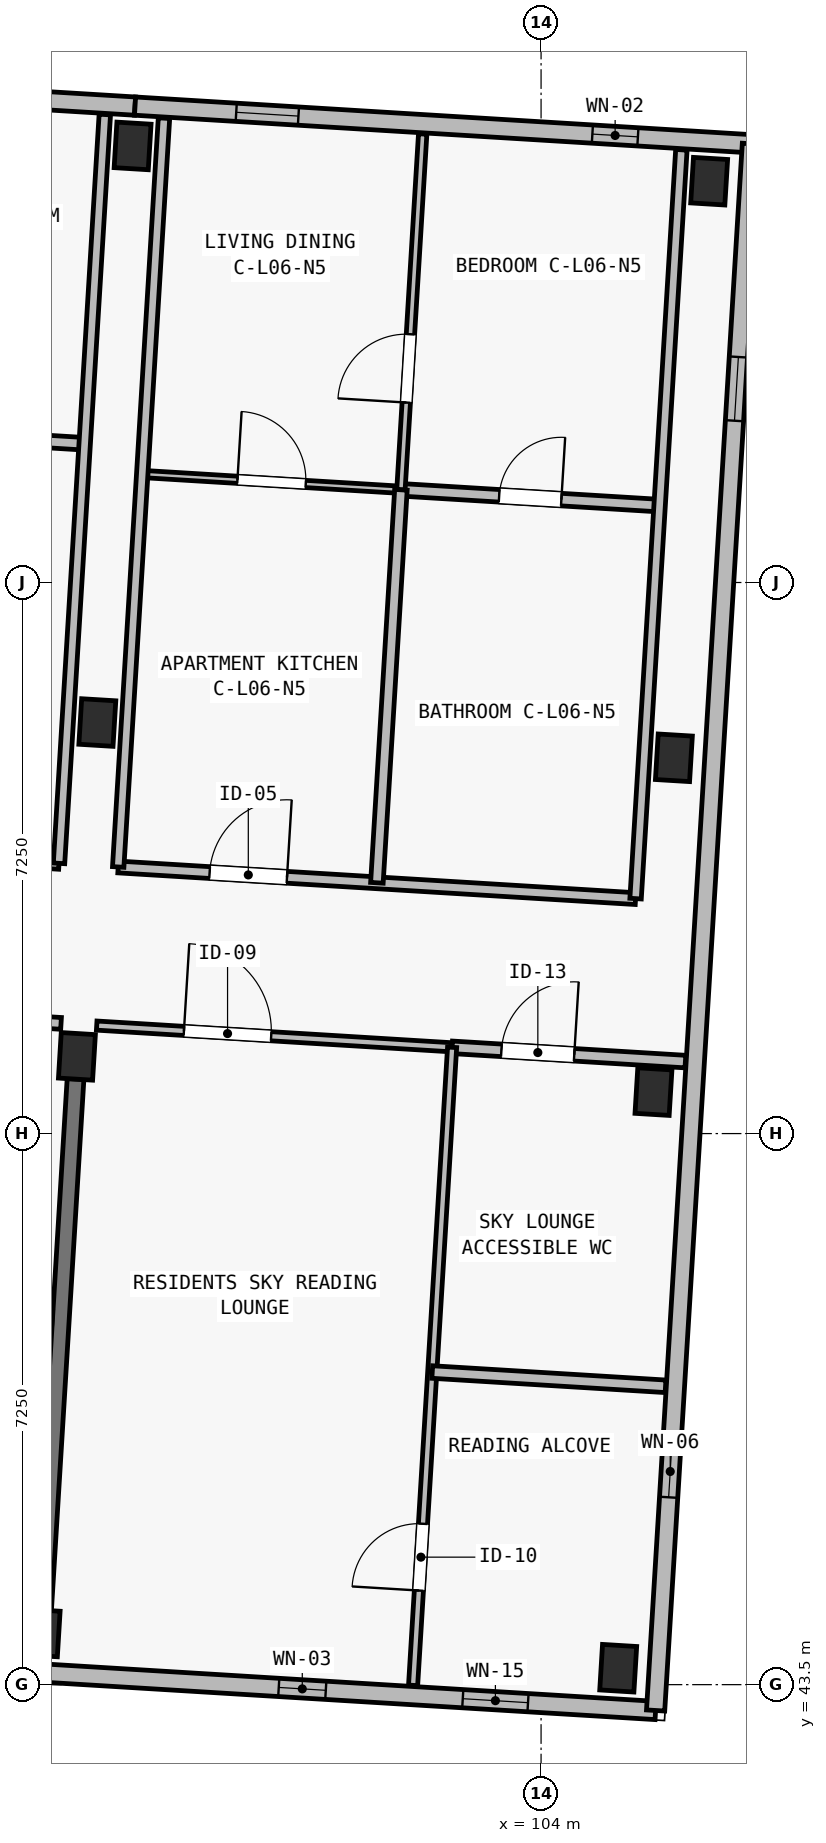
"""IFC4 building model, lengths in metres.
Left out: names, types, materials, properties, quantities, classifications, styles, units other than length and angle.
Written with IfcOpenShell. Run it as: python <this file> out.ifc"""

import sys

from ifc_helpers import new_model, si_unit, direction, frame, frame_2d, origin, origin_2d, place, context, subcontext, project, spatial, rectangle, extrude, element, fill, save


model = new_model("IFC4")
c1 = context("Model", 3, precision=1e-05, world=origin(), true_north=direction((0.0, 1.0)))
c2 = subcontext(c1, "Body", "Model", "MODEL_VIEW")
j1 = project(units=[si_unit("LENGTHUNIT", "METRE"), si_unit("PLANEANGLEUNIT", "RADIAN")], contexts=[c1])
p1 = place(None, origin())
s1 = spatial("IfcSite", under=j1, at=p1, CompositionType="ELEMENT")
p2 = place(p1, origin())
s2 = spatial("IfcBuilding", under=s1, at=p2, CompositionType="ELEMENT")
p3 = place(p2, frame((0.0, 0.0, 21.4)))
s3 = spatial("IfcBuildingStorey", under=s2, at=p3, CompositionType="ELEMENT", Elevation=21.4)
for number, where, z_axis, x_axis in (
    (1, (97.429, 44.18, 0.0), (0.0, 0.0, 1.0), (0.998, -0.061, 0.0)),
    (2, (97.893, 51.766, 0.0), (0.0, 0.0, 1.0), (0.998, -0.061, 0.0)),
    (3, (98.162, 56.158, 0.0), (0.0, 0.0, 1.0), (0.998, -0.061, 0.0)),
    (4, (98.626, 63.744, 0.0), (0.0, 0.0, 1.0), (0.998, -0.061, 0.0)),
    (5, (105.015, 43.716, 0.0), (0.0, 0.0, 1.0), (0.998, -0.061, 0.0)),
    (6, (105.479, 51.302, 0.0), (0.0, 0.0, 1.0), (0.998, -0.061, 0.0)),
    (7, (105.748, 55.694, 0.0), (0.0, 0.0, 1.0), (0.998, -0.061, 0.0)),
    (8, (106.211, 63.28, 0.0), (0.0, 0.0, 1.0), (0.998, -0.061, 0.0)),
):
    element("IfcColumn", number, at=place(p3, frame(where, z_axis=z_axis, x_axis=x_axis)), inside=s3, PredefinedType="COLUMN", context=c2, shape_type="SweptSolid", body=[
        extrude(rectangle(XDim=0.45, YDim=0.6, at=origin_2d()), origin(), (0.0, 0.0, 1.0), 3.25),
    ])
p4 = place(p3, frame((97.448, 44.479, 0.0), z_axis=(0.0, 0.0, 1.0), x_axis=(0.061034188237, 0.998135676081, 0.0)))
e9 = element("IfcWall", 9, at=p4, inside=s3, PredefinedType="SHEAR", context=c2, shape_type="SweptSolid", body=[
    extrude(rectangle(XDim=7.0, YDim=0.22, at=frame_2d((3.5, 0.0))), origin(), (0.0, 0.0, 1.0), 2.5),
])
p5 = place(p3, frame((105.507, 43.16, 0.0), z_axis=(0.0, 0.0, 1.0), x_axis=(-0.998134248939, 0.061057522844, 0.0)))
e10 = element("IfcWall", 10, at=p5, inside=s3, PredefinedType="SOLIDWALL", context=c2, shape_type="SweptSolid", body=[
    extrude(rectangle(XDim=8.125, YDim=0.24, at=frame_2d((4.062, 0.0))), origin(), (0.0, 0.0, 1.0), 3.0),
])
p6 = place(p5, frame((1.682, 0.0, 0.5)))
e11 = element("IfcOpeningElement", 11, at=p6, cuts=e10, PredefinedType="OPENING", context=c2, shape_type="SweptSolid", body=[
    extrude(rectangle(XDim=0.86, YDim=2.36, at=frame_2d((0.43, 1.18))), frame((0.0, 0.135, 0.0), z_axis=(0.0, -1.0, 0.0), x_axis=(1.0, 0.0, 0.0)), (0.0, 0.0, 1.0), 0.27),
])
p7 = place(p5, frame((4.347, 0.0, 0.52)))
e12 = element("IfcOpeningElement", 12, at=p7, cuts=e10, PredefinedType="OPENING", context=c2, shape_type="SweptSolid", body=[
    extrude(rectangle(XDim=0.62, YDim=2.28, at=frame_2d((0.31, 1.14))), frame((0.0, 0.135, 0.0), z_axis=(0.0, -1.0, 0.0), x_axis=(1.0, 0.0, 0.0)), (0.0, 0.0, 1.0), 0.27),
])
p8 = place(p3, frame((91.072, 64.732, 0.0), z_axis=(0.0, 0.0, 1.0), x_axis=(0.998133591969, -0.061068261669, 0.0)))
e13 = element("IfcWall", 13, at=p8, inside=s3, PredefinedType="SOLIDWALL", context=c2, shape_type="SweptSolid", body=[
    extrude(rectangle(XDim=7.6, YDim=0.24, at=frame_2d((3.8, 0.0))), origin(), (0.0, 0.0, 1.0), 3.0),
])
p9 = place(p8, frame((1.854, 0.0, 0.44)))
e14 = element("IfcOpeningElement", 14, at=p9, cuts=e13, PredefinedType="OPENING", context=c2, shape_type="SweptSolid", body=[
    extrude(rectangle(XDim=0.68, YDim=2.24, at=frame_2d((0.34, 1.12))), frame((0.0, 0.135, 0.0), z_axis=(0.0, -1.0, 0.0), x_axis=(1.0, 0.0, 0.0)), (0.0, 0.0, 1.0), 0.27),
])
p10 = place(p8, frame((5.018, 0.0, 0.5)))
e15 = element("IfcOpeningElement", 15, at=p10, cuts=e13, PredefinedType="OPENING", context=c2, shape_type="SweptSolid", body=[
    extrude(rectangle(XDim=0.76, YDim=2.34, at=frame_2d((0.38, 1.17))), frame((0.0, 0.135, 0.0), z_axis=(0.0, -1.0, 0.0), x_axis=(1.0, 0.0, 0.0)), (0.0, 0.0, 1.0), 0.27),
])
p11 = place(p3, frame((98.658, 64.268, 0.0), z_axis=(0.0, 0.0, 1.0), x_axis=(0.998134248939, -0.061057522844, 0.0)))
e16 = element("IfcWall", 16, at=p11, inside=s3, PredefinedType="SOLIDWALL", context=c2, shape_type="SweptSolid", body=[
    extrude(rectangle(XDim=8.125, YDim=0.24, at=frame_2d((4.062, 0.0))), origin(), (0.0, 0.0, 1.0), 3.0),
])
p12 = place(p11, frame((1.334, 0.0, 0.5)))
e17 = element("IfcOpeningElement", 17, at=p12, cuts=e16, PredefinedType="OPENING", context=c2, shape_type="SweptSolid", body=[
    extrude(rectangle(XDim=0.82, YDim=2.18, at=frame_2d((0.41, 1.09))), frame((0.0, 0.135, 0.0), z_axis=(0.0, -1.0, 0.0), x_axis=(1.0, 0.0, 0.0)), (0.0, 0.0, 1.0), 0.27),
])
p13 = place(p11, frame((6.029, 0.0, 0.44)))
e18 = element("IfcOpeningElement", 18, at=p13, cuts=e16, PredefinedType="OPENING", context=c2, shape_type="SweptSolid", body=[
    extrude(rectangle(XDim=0.6, YDim=2.22, at=frame_2d((0.3, 1.11))), frame((0.0, 0.135, 0.0), z_axis=(0.0, -1.0, 0.0), x_axis=(1.0, 0.0, 0.0)), (0.0, 0.0, 1.0), 0.27),
])
p14 = place(p3, frame((106.768, 63.771, 0.0), z_axis=(0.0, 0.0, 1.0), x_axis=(-0.061053332998, -0.99813450523, 0.0)))
e19 = element("IfcWall", 19, at=p14, inside=s3, PredefinedType="SOLIDWALL", context=c2, shape_type="SweptSolid", body=[
    extrude(rectangle(XDim=20.65, YDim=0.24, at=frame_2d((10.325, 0.0))), origin(), (0.0, 0.0, 1.0), 3.0),
])
p15 = place(p14, frame((2.81, 0.0, 0.45)))
e20 = element("IfcOpeningElement", 20, at=p15, cuts=e19, PredefinedType="OPENING", context=c2, shape_type="SweptSolid", body=[
    extrude(rectangle(XDim=0.84, YDim=2.28, at=frame_2d((0.42, 1.14))), frame((0.0, 0.135, 0.0), z_axis=(0.0, -1.0, 0.0), x_axis=(1.0, 0.0, 0.0)), (0.0, 0.0, 1.0), 0.27),
])
p16 = place(p14, frame((17.16, 0.0, 0.52)))
e21 = element("IfcOpeningElement", 21, at=p16, cuts=e19, PredefinedType="OPENING", context=c2, shape_type="SweptSolid", body=[
    extrude(rectangle(XDim=0.68, YDim=2.24, at=frame_2d((0.34, 1.12))), frame((0.0, 0.135, 0.0), z_axis=(0.0, -1.0, 0.0), x_axis=(1.0, 0.0, 0.0)), (0.0, 0.0, 1.0), 0.27),
])
p17 = place(p3, frame((90.567, 52.635, 0.0), z_axis=(0.0, 0.0, 1.0), x_axis=(0.998134569689, -0.061052279168, 0.0)))
e22 = element("IfcWall", 22, at=p17, inside=s3, PredefinedType="PARTITIONING", context=c2, shape_type="SweptSolid", body=[
    extrude(rectangle(XDim=7.13, YDim=0.155, at=frame_2d((3.565, 0.0))), origin(), (0.0, 0.0, 1.0), 2.97),
])
p18 = place(p17, frame((1.355, 0.0, 0.0)))
e23 = element("IfcOpeningElement", 23, at=p18, cuts=e22, PredefinedType="OPENING", context=c2, shape_type="SweptSolid", body=[
    extrude(rectangle(XDim=0.98, YDim=2.15, at=frame_2d((0.49, 1.075))), frame((0.0, 0.093, 0.0), z_axis=(0.0, -1.0, 0.0), x_axis=(1.0, 0.0, 0.0)), (0.0, 0.0, 1.0), 0.185),
])
p19 = place(p3, frame((98.153, 52.171, 0.0), z_axis=(0.0, 0.0, 1.0), x_axis=(0.998133238441, -0.06107403965, 0.0)))
e24 = element("IfcWall", 24, at=p19, inside=s3, PredefinedType="PARTITIONING", context=c2, shape_type="SweptSolid", body=[
    extrude(rectangle(XDim=4.685, YDim=0.12, at=frame_2d((2.343, 0.0))), origin(), (0.0, 0.0, 1.0), 2.97),
])
p20 = place(p19, frame((1.15, 0.0, 0.0)))
e25 = element("IfcOpeningElement", 25, at=p20, cuts=e24, PredefinedType="OPENING", context=c2, shape_type="SweptSolid", body=[
    extrude(rectangle(XDim=1.15, YDim=2.15, at=frame_2d((0.575, 1.075))), frame((0.0, 0.075, 0.0), z_axis=(0.0, -1.0, 0.0), x_axis=(1.0, 0.0, 0.0)), (0.0, 0.0, 1.0), 0.15),
])
p21 = place(p3, frame((102.83, 51.885, 0.0), z_axis=(0.0, 0.0, 1.0), x_axis=(0.998134491017, -0.061053565351, 0.0)))
e26 = element("IfcWall", 26, at=p21, inside=s3, PredefinedType="PLUMBINGWALL", context=c2, shape_type="SweptSolid", body=[
    extrude(rectangle(XDim=3.075, YDim=0.165, at=frame_2d((1.538, 0.0))), origin(), (0.0, 0.0, 1.0), 2.97),
])
p22 = place(p21, frame((0.65, 0.0, 0.0)))
e27 = element("IfcOpeningElement", 27, at=p22, cuts=e26, PredefinedType="OPENING", context=c2, shape_type="SweptSolid", body=[
    extrude(rectangle(XDim=0.96, YDim=2.12, at=frame_2d((0.48, 1.06))), frame((0.0, 0.097, 0.0), z_axis=(0.0, -1.0, 0.0), x_axis=(1.0, 0.0, 0.0)), (0.0, 0.0, 1.0), 0.195),
])
p23 = place(p3, frame((102.316, 43.49, 0.0), z_axis=(0.0, 0.0, 1.0), x_axis=(0.061049859271, 0.998134717702, 0.0)))
e28 = element("IfcWall", 28, at=p23, inside=s3, PredefinedType="PARTITIONING", context=c2, shape_type="SweptSolid", body=[
    extrude(rectangle(XDim=8.41, YDim=0.12, at=frame_2d((4.205, 0.0))), origin(), (0.0, 0.0, 1.0), 2.97),
])
p24 = place(p23, frame((1.25, 0.0, 0.0)))
e29 = element("IfcOpeningElement", 29, at=p24, cuts=e28, PredefinedType="OPENING", context=c2, shape_type="SweptSolid", body=[
    extrude(rectangle(XDim=0.88, YDim=2.1, at=frame_2d((0.44, 1.05))), frame((0.0, 0.075, 0.0), z_axis=(0.0, -1.0, 0.0), x_axis=(1.0, 0.0, 0.0)), (0.0, 0.0, 1.0), 0.15),
])
p25 = place(p3, frame((102.568, 47.613, 0.0), z_axis=(0.0, 0.0, 1.0), x_axis=(0.99813419504, -0.061058403944, 0.0)))
e30 = element("IfcWall", 30, at=p25, inside=s3, PredefinedType="PLUMBINGWALL", context=c2, shape_type="SweptSolid", body=[
    extrude(rectangle(XDim=3.075, YDim=0.165, at=frame_2d((1.537, 0.0))), origin(), (0.0, 0.0, 1.0), 2.97),
])
p26 = place(p3, frame((90.85, 54.721, 0.0), z_axis=(0.0, 0.0, 1.0), x_axis=(0.998135665032, -0.06103436893, 0.0)))
e31 = element("IfcWall", 31, at=p26, inside=s3, PredefinedType="PARTITIONING", context=c2, shape_type="SweptSolid", body=[
    extrude(rectangle(XDim=6.82, YDim=0.155, at=frame_2d((3.41, 0.0))), origin(), (0.0, 0.0, 1.0), 2.97),
])
p27 = place(p26, frame((1.205, 0.0, 0.0)))
e32 = element("IfcOpeningElement", 32, at=p27, cuts=e31, PredefinedType="OPENING", context=c2, shape_type="SweptSolid", body=[
    extrude(rectangle(XDim=0.98, YDim=2.15, at=frame_2d((0.49, 1.075))), frame((0.0, 0.093, 0.0), z_axis=(0.0, -1.0, 0.0), x_axis=(1.0, 0.0, 0.0)), (0.0, 0.0, 1.0), 0.185),
])
p28 = place(p3, frame((94.592, 60.033, 0.0), z_axis=(0.0, 0.0, 1.0), x_axis=(0.998133617109, -0.061067850767, 0.0)))
e33 = element("IfcWall", 33, at=p28, inside=s3, PredefinedType="PLUMBINGWALL", context=c2, shape_type="SweptSolid", body=[
    extrude(rectangle(XDim=3.41, YDim=0.165, at=frame_2d((1.705, 0.0))), origin(), (0.0, 0.0, 1.0), 2.97),
])
p29 = place(p28, frame((1.295, 0.0, 0.0)))
e34 = element("IfcOpeningElement", 34, at=p29, cuts=e33, PredefinedType="OPENING", context=c2, shape_type="SweptSolid", body=[
    extrude(rectangle(XDim=0.82, YDim=2.08, at=frame_2d((0.41, 1.04))), frame((0.0, 0.097, 0.0), z_axis=(0.0, -1.0, 0.0), x_axis=(1.0, 0.0, 0.0)), (0.0, 0.0, 1.0), 0.195),
])
p30 = place(p3, frame((97.658, 54.305, 0.0), z_axis=(0.0, 0.0, 1.0), x_axis=(0.061047700465, 0.998134849741, 0.0)))
e35 = element("IfcWall", 35, at=p30, inside=s3, PredefinedType="PARTITIONING", context=c2, shape_type="SweptSolid", body=[
    extrude(rectangle(XDim=9.87, YDim=0.15, at=frame_2d((4.935, 0.0))), origin(), (0.0, 0.0, 1.0), 2.97),
])
p31 = place(p3, frame((98.436, 54.258, 0.0), z_axis=(0.0, 0.0, 1.0), x_axis=(0.998133350094, -0.061072214879, 0.0)))
e36 = element("IfcWall", 36, at=p31, inside=s3, PredefinedType="PARTITIONING", context=c2, shape_type="SweptSolid", body=[
    extrude(rectangle(XDim=6.82, YDim=0.155, at=frame_2d((3.41, 0.0))), origin(), (0.0, 0.0, 1.0), 2.97),
])
p32 = place(p31, frame((1.205, 0.0, 0.0)))
e37 = element("IfcOpeningElement", 37, at=p32, cuts=e36, PredefinedType="OPENING", context=c2, shape_type="SweptSolid", body=[
    extrude(rectangle(XDim=1.02, YDim=2.2, at=frame_2d((0.51, 1.1))), frame((0.0, 0.093, 0.0), z_axis=(0.0, -1.0, 0.0), x_axis=(1.0, 0.0, 0.0)), (0.0, 0.0, 1.0), 0.185),
])
p33 = place(p3, frame((98.752, 59.428, 0.0), z_axis=(0.0, 0.0, 1.0), x_axis=(0.998137711988, -0.061000884486, 0.0)))
e38 = element("IfcWall", 38, at=p33, inside=s3, PredefinedType="PARTITIONING", context=c2, shape_type="SweptSolid", body=[
    extrude(rectangle(XDim=3.41, YDim=0.095, at=frame_2d((1.705, 0.0))), origin(), (0.0, 0.0, 1.0), 2.97),
])
p34 = place(p33, frame((1.255, 0.0, 0.0)))
e39 = element("IfcOpeningElement", 39, at=p34, cuts=e38, PredefinedType="OPENING", context=c2, shape_type="SweptSolid", body=[
    extrude(rectangle(XDim=0.9, YDim=2.1, at=frame_2d((0.45, 1.05))), frame((0.0, 0.062, 0.0), z_axis=(0.0, -1.0, 0.0), x_axis=(1.0, 0.0, 0.0)), (0.0, 0.0, 1.0), 0.125),
])
p35 = place(p3, frame((102.156, 59.22, 0.0), z_axis=(0.0, 0.0, 1.0), x_axis=(0.998133617109, -0.061067850767, 0.0)))
e40 = element("IfcWall", 40, at=p35, inside=s3, PredefinedType="PLUMBINGWALL", context=c2, shape_type="SweptSolid", body=[
    extrude(rectangle(XDim=3.41, YDim=0.165, at=frame_2d((1.705, 0.0))), origin(), (0.0, 0.0, 1.0), 2.97),
])
p36 = place(p35, frame((1.295, 0.0, 0.0)))
e41 = element("IfcOpeningElement", 41, at=p36, cuts=e40, PredefinedType="OPENING", context=c2, shape_type="SweptSolid", body=[
    extrude(rectangle(XDim=0.82, YDim=2.08, at=frame_2d((0.41, 1.04))), frame((0.0, 0.097, 0.0), z_axis=(0.0, -1.0, 0.0), x_axis=(1.0, 0.0, 0.0)), (0.0, 0.0, 1.0), 0.195),
])
p37 = place(p3, frame((102.156, 59.22, 0.0), z_axis=(0.0, 0.0, 1.0), x_axis=(0.061062434628, 0.998133948465, 0.0)))
e42 = element("IfcWall", 42, at=p37, inside=s3, PredefinedType="PARTITIONING", context=c2, shape_type="SweptSolid", body=[
    extrude(rectangle(XDim=4.69, YDim=0.11, at=frame_2d((2.345, 0.0))), origin(), (0.0, 0.0, 1.0), 2.97),
])
p38 = place(p37, frame((1.15, 0.0, 0.0)))
e43 = element("IfcOpeningElement", 43, at=p38, cuts=e42, PredefinedType="OPENING", context=c2, shape_type="SweptSolid", body=[
    extrude(rectangle(XDim=0.9, YDim=2.1, at=frame_2d((0.45, 1.05))), frame((0.0, 0.07, 0.0), z_axis=(0.0, -1.0, 0.0), x_axis=(1.0, 0.0, 0.0)), (0.0, 0.0, 1.0), 0.14),
])
p39 = place(p3, frame((101.84, 54.049, 0.0), z_axis=(0.0, 0.0, 1.0), x_axis=(0.06103436051, 0.998135665547, 0.0)))
e44 = element("IfcWall", 44, at=p39, inside=s3, PredefinedType="PLUMBINGWALL", context=c2, shape_type="SweptSolid", body=[
    extrude(rectangle(XDim=5.18, YDim=0.165, at=frame_2d((2.59, 0.0))), origin(), (0.0, 0.0, 1.0), 2.97),
])
for number, where, z_axis, x_axis in (
    (45, (98.436, 54.258, 0.0), (0.0, 0.0, 1.0), (0.061, 0.998, 0.0)),
    (46, (105.243, 53.841, 0.0), (0.0, 0.0, 1.0), (0.061, 0.998, 0.0)),
):
    element("IfcWall", number, at=place(p3, frame(where, z_axis=z_axis, x_axis=x_axis)), inside=s3, PredefinedType="PARTITIONING", context=c2, shape_type="SweptSolid", body=[
        extrude(rectangle(XDim=9.87, YDim=0.15, at=frame_2d((4.935, 0.0))), origin(), (0.0, 0.0, 1.0), 2.97),
    ])
p40 = place(p6, origin())
e47 = element("IfcWindow", 47, at=p40, inside=s3, PartitioningType="SINGLE_PANEL", PredefinedType="WINDOW", context=c2, shape_type="SweptSolid", body=[
    extrude(rectangle(XDim=0.86, YDim=2.36, at=frame_2d((0.43, 1.18))), frame((0.0, 0.03, 0.0), z_axis=(0.0, -1.0, 0.0), x_axis=(1.0, 0.0, 0.0)), (0.0, 0.0, 1.0), 0.06),
])
fill(e11, e47)
p41 = place(p7, origin())
e48 = element("IfcWindow", 48, at=p41, inside=s3, PartitioningType="SINGLE_PANEL", PredefinedType="WINDOW", context=c2, shape_type="SweptSolid", body=[
    extrude(rectangle(XDim=0.62, YDim=2.28, at=frame_2d((0.31, 1.14))), frame((0.0, 0.03, 0.0), z_axis=(0.0, -1.0, 0.0), x_axis=(1.0, 0.0, 0.0)), (0.0, 0.0, 1.0), 0.06),
])
fill(e12, e48)
p42 = place(p12, origin())
e49 = element("IfcWindow", 49, at=p42, inside=s3, PartitioningType="SINGLE_PANEL", PredefinedType="WINDOW", context=c2, shape_type="SweptSolid", body=[
    extrude(rectangle(XDim=0.82, YDim=2.18, at=frame_2d((0.41, 1.09))), frame((0.0, 0.03, 0.0), z_axis=(0.0, -1.0, 0.0), x_axis=(1.0, 0.0, 0.0)), (0.0, 0.0, 1.0), 0.06),
])
fill(e17, e49)
p43 = place(p13, origin())
e50 = element("IfcWindow", 50, at=p43, inside=s3, PartitioningType="SINGLE_PANEL", PredefinedType="WINDOW", context=c2, shape_type="SweptSolid", body=[
    extrude(rectangle(XDim=0.6, YDim=2.22, at=frame_2d((0.3, 1.11))), frame((0.0, 0.03, 0.0), z_axis=(0.0, -1.0, 0.0), x_axis=(1.0, 0.0, 0.0)), (0.0, 0.0, 1.0), 0.06),
])
fill(e18, e50)
p44 = place(p15, origin())
e51 = element("IfcWindow", 51, at=p44, inside=s3, PartitioningType="SINGLE_PANEL", PredefinedType="WINDOW", context=c2, shape_type="SweptSolid", body=[
    extrude(rectangle(XDim=0.84, YDim=2.28, at=frame_2d((0.42, 1.14))), frame((0.0, 0.03, 0.0), z_axis=(0.0, -1.0, 0.0), x_axis=(1.0, 0.0, 0.0)), (0.0, 0.0, 1.0), 0.06),
])
fill(e20, e51)
p45 = place(p16, origin())
e52 = element("IfcWindow", 52, at=p45, inside=s3, PartitioningType="SINGLE_PANEL", PredefinedType="WINDOW", context=c2, shape_type="SweptSolid", body=[
    extrude(rectangle(XDim=0.68, YDim=2.24, at=frame_2d((0.34, 1.12))), frame((0.0, 0.03, 0.0), z_axis=(0.0, -1.0, 0.0), x_axis=(1.0, 0.0, 0.0)), (0.0, 0.0, 1.0), 0.06),
])
fill(e21, e52)
p46 = place(p20, origin())
e53 = element("IfcDoor", 53, at=p46, inside=s3, OperationType="SINGLE_SWING_LEFT", PredefinedType="DOOR", context=c2, shape_type="SweptSolid", body=[
    extrude(rectangle(XDim=1.15, YDim=2.15, at=frame_2d((0.575, 1.075))), frame((0.0, 0.025, 0.0), z_axis=(0.0, -1.0, 0.0), x_axis=(1.0, 0.0, 0.0)), (0.0, 0.0, 1.0), 0.05),
])
fill(e25, e53)
p47 = place(p22, origin())
e54 = element("IfcDoor", 54, at=p47, inside=s3, OperationType="SINGLE_SWING_RIGHT", PredefinedType="DOOR", context=c2, shape_type="SweptSolid", body=[
    extrude(rectangle(XDim=0.96, YDim=2.12, at=frame_2d((0.48, 1.06))), frame((0.0, 0.025, 0.0), z_axis=(0.0, -1.0, 0.0), x_axis=(1.0, 0.0, 0.0)), (0.0, 0.0, 1.0), 0.05),
])
fill(e27, e54)
p48 = place(p24, origin())
e55 = element("IfcDoor", 55, at=p48, inside=s3, OperationType="SINGLE_SWING_LEFT", PredefinedType="DOOR", context=c2, shape_type="SweptSolid", body=[
    extrude(rectangle(XDim=0.88, YDim=2.1, at=frame_2d((0.44, 1.05))), frame((0.0, 0.025, 0.0), z_axis=(0.0, -1.0, 0.0), x_axis=(1.0, 0.0, 0.0)), (0.0, 0.0, 1.0), 0.05),
])
fill(e29, e55)
p49 = place(p32, origin())
e56 = element("IfcDoor", 56, at=p49, inside=s3, OperationType="SINGLE_SWING_RIGHT", PredefinedType="DOOR", context=c2, shape_type="SweptSolid", body=[
    extrude(rectangle(XDim=1.02, YDim=2.2, at=frame_2d((0.51, 1.1))), frame((0.0, 0.025, 0.0), z_axis=(0.0, -1.0, 0.0), x_axis=(1.0, 0.0, 0.0)), (0.0, 0.0, 1.0), 0.05),
])
fill(e37, e56)
p50 = place(p34, origin())
e57 = element("IfcDoor", 57, at=p50, inside=s3, OperationType="SINGLE_SWING_LEFT", PredefinedType="DOOR", context=c2, shape_type="SweptSolid", body=[
    extrude(rectangle(XDim=0.9, YDim=2.1, at=frame_2d((0.45, 1.05))), frame((0.0, 0.025, 0.0), z_axis=(0.0, -1.0, 0.0), x_axis=(1.0, 0.0, 0.0)), (0.0, 0.0, 1.0), 0.05),
])
fill(e39, e57)
p51 = place(p36, origin())
e58 = element("IfcDoor", 58, at=p51, inside=s3, OperationType="SINGLE_SWING_RIGHT", PredefinedType="DOOR", context=c2, shape_type="SweptSolid", body=[
    extrude(rectangle(XDim=0.82, YDim=2.08, at=frame_2d((0.41, 1.04))), frame((0.0, 0.025, 0.0), z_axis=(0.0, -1.0, 0.0), x_axis=(1.0, 0.0, 0.0)), (0.0, 0.0, 1.0), 0.05),
])
fill(e41, e58)
p52 = place(p38, origin())
e59 = element("IfcDoor", 59, at=p52, inside=s3, OperationType="SINGLE_SWING_LEFT", PredefinedType="DOOR", context=c2, shape_type="SweptSolid", body=[
    extrude(rectangle(XDim=0.9, YDim=2.1, at=frame_2d((0.45, 1.05))), frame((0.0, 0.025, 0.0), z_axis=(0.0, -1.0, 0.0), x_axis=(1.0, 0.0, 0.0)), (0.0, 0.0, 1.0), 0.05),
])
fill(e43, e59)
save(model, sys.argv[1])
